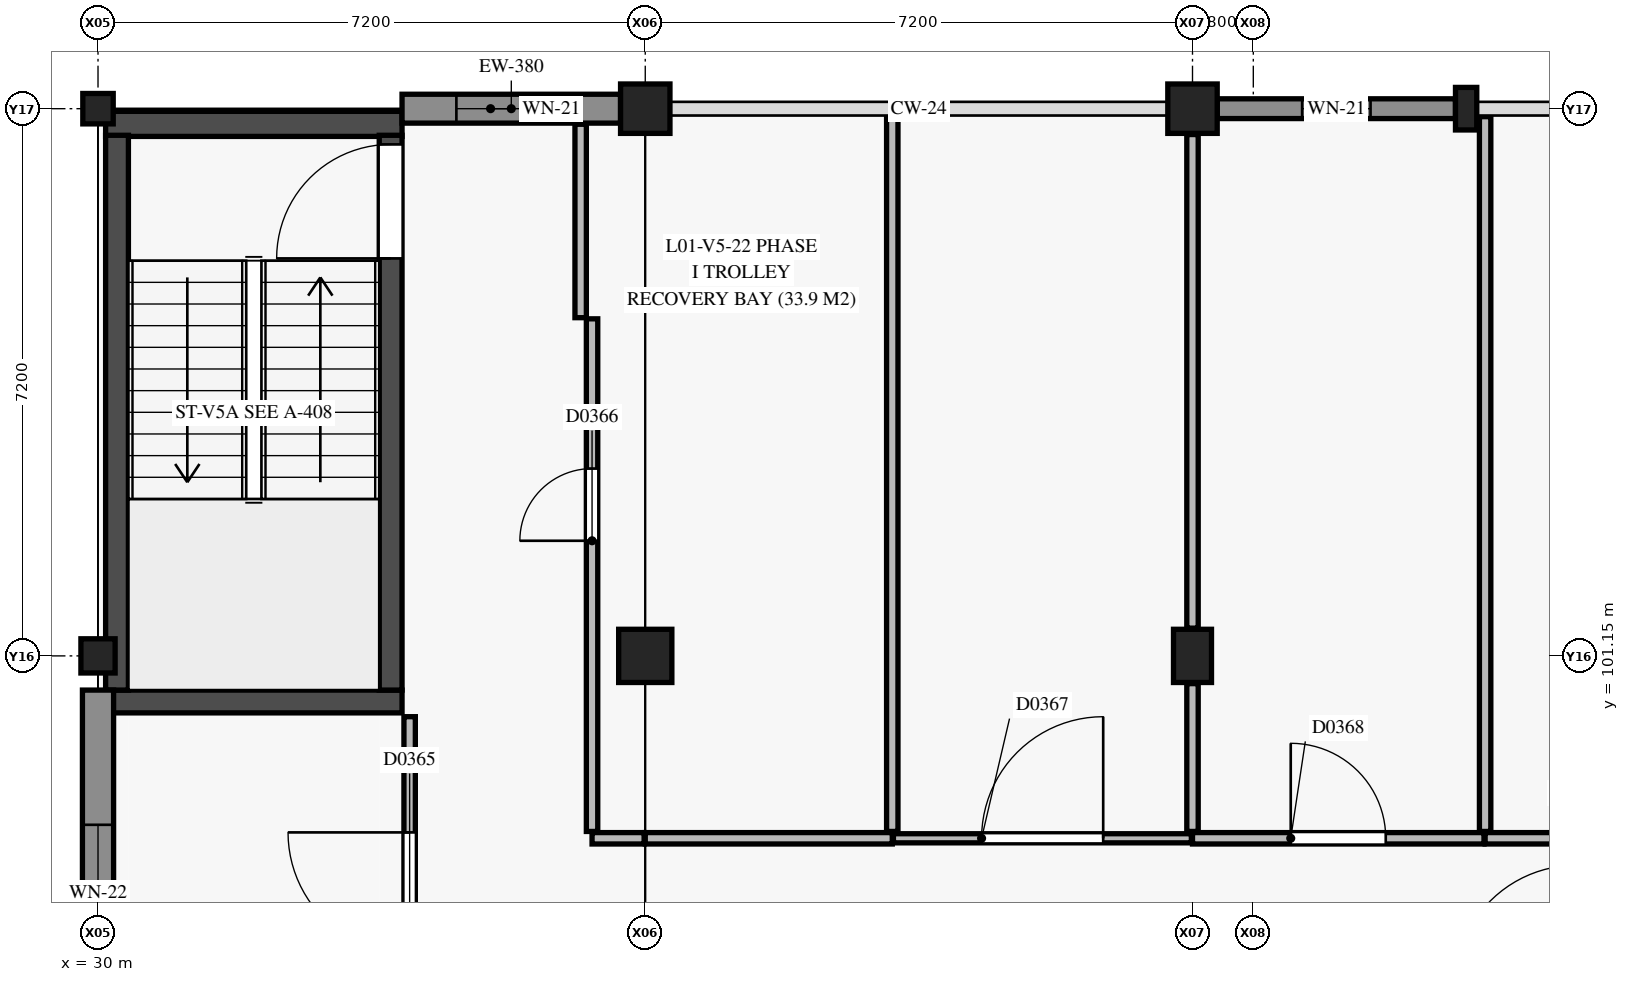
"""IFC4 building model, lengths in metres.
Left out: names, types, materials, properties, quantities, classifications, styles, units other than length and angle.
Written with IfcOpenShell. Run it as: python <this file> out.ifc"""

import sys

from ifc_helpers import new_model, si_unit, direction, frame, frame_2d, origin, origin_2d, place, context, subcontext, project, spatial, rectangle, circle, extrude, element, fill, save


model = new_model("IFC4")
c1 = context("Model", 3, precision=1e-05, world=origin(), true_north=direction((0.0, 1.0)))
c2 = subcontext(c1, "Body", "Model", "MODEL_VIEW")
j1 = project(units=[si_unit("LENGTHUNIT", "METRE"), si_unit("PLANEANGLEUNIT", "RADIAN")], contexts=[c1])
p1 = place(None, origin())
s1 = spatial("IfcSite", under=j1, at=p1, CompositionType="ELEMENT")
p2 = place(p1, origin())
s2 = spatial("IfcBuilding", under=s1, at=p2, CompositionType="ELEMENT")
p3 = place(p2, frame((0.0, 0.0, 4.8)))
s3 = spatial("IfcBuildingStorey", under=s2, at=p3, CompositionType="ELEMENT", Elevation=4.8)
p4 = place(p3, frame((30.0, 101.15, 0.0), z_axis=(0.0, 0.0, 1.0), x_axis=(1.0, 0.0, 0.0)))
e1 = element("IfcColumn", 1, at=p4, inside=s3, PredefinedType="COLUMN", context=c2, shape_type="SweptSolid", body=[
    extrude(rectangle(XDim=0.45, YDim=0.45, at=origin_2d()), origin(), (0.0, 0.0, 1.0), 4.2),
])
p5 = place(p3, frame((30.0, 108.35, 0.0), z_axis=(0.0, 0.0, 1.0), x_axis=(1.0, 0.0, 0.0)))
e2 = element("IfcColumn", 2, at=p5, inside=s3, PredefinedType="COLUMN", context=c2, shape_type="SweptSolid", body=[
    extrude(rectangle(XDim=0.4, YDim=0.4, at=origin_2d()), origin(), (0.0, 0.0, 1.0), 4.2),
])
p6 = place(p3, frame((37.2, 101.15, 0.0), z_axis=(0.0, 0.0, 1.0), x_axis=(1.0, 0.0, 0.0)))
e3 = element("IfcColumn", 3, at=p6, inside=s3, PredefinedType="COLUMN", context=c2, shape_type="SweptSolid", body=[
    extrude(rectangle(XDim=0.7, YDim=0.7, at=origin_2d()), origin(), (0.0, 0.0, 1.0), 4.2),
])
p7 = place(p3, frame((37.2, 108.35, 0.0), z_axis=(0.0, 0.0, 1.0), x_axis=(1.0, 0.0, 0.0)))
e4 = element("IfcColumn", 4, at=p7, inside=s3, PredefinedType="COLUMN", context=c2, shape_type="SweptSolid", body=[
    extrude(rectangle(XDim=0.65, YDim=0.65, at=origin_2d()), origin(), (0.0, 0.0, 1.0), 4.2),
])
p8 = place(p3, frame((44.4, 101.15, 0.0), z_axis=(0.0, 0.0, 1.0), x_axis=(1.0, 0.0, 0.0)))
e5 = element("IfcColumn", 5, at=p8, inside=s3, PredefinedType="COLUMN", context=c2, shape_type="SweptSolid", body=[
    extrude(rectangle(XDim=0.5, YDim=0.7, at=origin_2d()), origin(), (0.0, 0.0, 1.0), 4.2),
])
p9 = place(p3, frame((44.4, 108.35, 0.0), z_axis=(0.0, 0.0, 1.0), x_axis=(1.0, 0.0, 0.0)))
e6 = element("IfcColumn", 6, at=p9, inside=s3, PredefinedType="COLUMN", context=c2, shape_type="SweptSolid", body=[
    extrude(circle(Radius=0.325, at=origin_2d()), origin(), (0.0, 0.0, 1.0), 4.2),
])
p10 = place(p3, frame((48.0, 108.35, 0.0), z_axis=(0.0, 0.0, 1.0), x_axis=(1.0, 0.0, 0.0)))
e7 = element("IfcColumn", 7, at=p10, inside=s3, PredefinedType="PILASTER", context=c2, shape_type="SweptSolid", body=[
    extrude(rectangle(XDim=0.28, YDim=0.56, at=origin_2d()), origin(), (0.0, 0.0, 1.0), 4.2),
])
p11 = place(p3, frame((30.1, 100.55, 0.0), z_axis=(0.0, 0.0, 1.0), x_axis=(1.0, 0.0, 0.0)))
e8 = element("IfcWall", 8, at=p11, inside=s3, PredefinedType="SHEAR", context=c2, shape_type="SweptSolid", body=[
    extrude(rectangle(XDim=3.9, YDim=0.3, at=frame_2d((1.95, 0.0))), origin(), (0.0, 0.0, 1.0), 3.95),
])
p12 = place(p3, frame((30.1, 108.15, 0.0), z_axis=(0.0, 0.0, 1.0), x_axis=(1.0, 0.0, 0.0)))
e9 = element("IfcWall", 9, at=p12, inside=s3, PredefinedType="SHEAR", context=c2, shape_type="SweptSolid", body=[
    extrude(rectangle(XDim=3.9, YDim=0.33, at=frame_2d((1.95, 0.0))), origin(), (0.0, 0.0, 1.0), 3.95),
])
p13 = place(p3, frame((30.25, 100.7, 0.0), z_axis=(0.0, 0.0, 1.0), x_axis=(0.0, 1.0, 0.0)))
e10 = element("IfcWall", 10, at=p13, inside=s3, PredefinedType="SHEAR", context=c2, shape_type="SweptSolid", body=[
    extrude(rectangle(XDim=7.3, YDim=0.3, at=frame_2d((3.65, 0.0))), origin(), (0.0, 0.0, 1.0), 3.95),
])
p14 = place(p3, frame((33.85, 100.7, 0.0), z_axis=(0.0, 0.0, 1.0), x_axis=(0.0, 1.0, 0.0)))
e11 = element("IfcWall", 11, at=p14, inside=s3, PredefinedType="SHEAR", context=c2, shape_type="SweptSolid", body=[
    extrude(rectangle(XDim=7.3, YDim=0.3, at=frame_2d((3.65, 0.0))), origin(), (0.0, 0.0, 1.0), 3.95),
])
p15 = place(p14, frame((5.68, 0.0, 0.0)))
e12 = element("IfcOpeningElement", 12, at=p15, cuts=e11, PredefinedType="OPENING", context=c2, shape_type="SweptSolid", body=[
    extrude(rectangle(XDim=1.5, YDim=2.15, at=frame_2d((0.75, 1.075))), frame((0.0, 0.16, 0.0), z_axis=(0.0, -1.0, 0.0), x_axis=(1.0, 0.0, 0.0)), (0.0, 0.0, 1.0), 0.32),
])
p16 = place(p3, frame((30.0, 94.2, 0.0), z_axis=(0.0, 0.0, 1.0), x_axis=(0.0, 1.0, 0.0)))
e13 = element("IfcWall", 13, at=p16, inside=s3, PredefinedType="USERDEFINED", context=c2, shape_type="SweptSolid", body=[
    extrude(rectangle(XDim=6.5, YDim=0.41, at=frame_2d((3.25, 0.0))), origin(), (0.0, 0.0, 1.0), 3.13),
])
p17 = place(p16, frame((2.927, 0.0, 0.9)))
e14 = element("IfcOpeningElement", 14, at=p17, cuts=e13, PredefinedType="OPENING", context=c2, shape_type="SweptSolid", body=[
    extrude(rectangle(XDim=1.8, YDim=0.9, at=frame_2d((0.9, 0.45))), frame((0.0, 0.215, 0.0), z_axis=(0.0, -1.0, 0.0), x_axis=(1.0, 0.0, 0.0)), (0.0, 0.0, 1.0), 0.43),
])
p18 = place(p3, frame((34.0, 108.35, 0.0), z_axis=(0.0, 0.0, 1.0), x_axis=(1.0, 0.0, 0.0)))
e15 = element("IfcWall", 15, at=p18, inside=s3, PredefinedType="USERDEFINED", context=c2, shape_type="SweptSolid", body=[
    extrude(rectangle(XDim=2.875, YDim=0.38, at=frame_2d((1.438, 0.0))), origin(), (0.0, 0.0, 1.0), 3.13),
])
p19 = place(p18, frame((0.715, 0.0, 0.95)))
e16 = element("IfcOpeningElement", 16, at=p19, cuts=e15, PredefinedType="OPENING", context=c2, shape_type="SweptSolid", body=[
    extrude(rectangle(XDim=0.9, YDim=1.2, at=frame_2d((0.45, 0.6))), frame((0.0, 0.2, 0.0), z_axis=(0.0, -1.0, 0.0), x_axis=(1.0, 0.0, 0.0)), (0.0, 0.0, 1.0), 0.4),
])
p20 = place(p3, frame((44.725, 108.35, 0.0), z_axis=(0.0, 0.0, 1.0), x_axis=(1.0, 0.0, 0.0)))
e17 = element("IfcWall", 17, at=p20, inside=s3, PredefinedType="SOLIDWALL", context=c2, shape_type="SweptSolid", body=[
    extrude(rectangle(XDim=3.135, YDim=0.26, at=frame_2d((1.567, 0.0))), origin(), (0.0, 0.0, 1.0), 3.13),
])
p21 = place(p20, frame((1.117, 0.0, 0.95)))
e18 = element("IfcOpeningElement", 18, at=p21, cuts=e17, PredefinedType="OPENING", context=c2, shape_type="SweptSolid", body=[
    extrude(rectangle(XDim=0.9, YDim=1.2, at=frame_2d((0.45, 0.6))), frame((0.0, 0.14, 0.0), z_axis=(0.0, -1.0, 0.0), x_axis=(1.0, 0.0, 0.0)), (0.0, 0.0, 1.0), 0.28),
])
p22 = place(p3, frame((48.25, 98.75, 0.0), z_axis=(0.0, 0.0, 1.0), x_axis=(1.0, 0.0, 0.0)))
e19 = element("IfcWall", 19, at=p22, inside=s3, PredefinedType="PARTITIONING", context=c2, shape_type="SweptSolid", body=[
    extrude(rectangle(XDim=1.11, YDim=0.15, at=frame_2d((0.555, 0.0))), origin(), (0.0, 0.0, 1.0), 3.475),
])
p23 = place(p3, frame((34.1, 95.705, 0.0), z_axis=(0.0, 0.0, 1.0), x_axis=(0.0, 1.0, 0.0)))
e20 = element("IfcWall", 20, at=p23, inside=s3, PredefinedType="PARTITIONING", context=c2, shape_type="SweptSolid", body=[
    extrude(rectangle(XDim=4.645, YDim=0.15, at=frame_2d((2.323, 0.0))), origin(), (0.0, 0.0, 1.0), 3.475),
])
p24 = place(p23, frame((1.522, 0.0, 0.0)))
e21 = element("IfcOpeningElement", 21, at=p24, cuts=e20, PredefinedType="OPENING", context=c2, shape_type="SweptSolid", body=[
    extrude(rectangle(XDim=1.6, YDim=2.25, at=frame_2d((0.8, 1.125))), frame((0.0, 0.085, 0.0), z_axis=(0.0, -1.0, 0.0), x_axis=(1.0, 0.0, 0.0)), (0.0, 0.0, 1.0), 0.17),
])
p25 = place(p3, frame((36.35, 105.6, 0.0), z_axis=(0.0, 0.0, 1.0), x_axis=(0.0, 1.0, 0.0)))
e22 = element("IfcWall", 22, at=p25, inside=s3, PredefinedType="PARTITIONING", context=c2, shape_type="SweptSolid", body=[
    extrude(rectangle(XDim=2.545, YDim=0.15, at=frame_2d((1.272, 0.0))), origin(), (0.0, 0.0, 1.0), 3.95),
])
p26 = place(p3, frame((37.2, 98.75, 0.0), z_axis=(0.0, 0.0, 1.0), x_axis=(1.0, 0.0, 0.0)))
e23 = element("IfcWall", 23, at=p26, inside=s3, PredefinedType="PARTITIONING", context=c2, shape_type="SweptSolid", body=[
    extrude(rectangle(XDim=3.25, YDim=0.15, at=frame_2d((1.625, 0.0))), origin(), (0.0, 0.0, 1.0), 3.355),
])
p27 = place(p3, frame((36.5, 98.75, 0.0), z_axis=(0.0, 0.0, 1.0), x_axis=(1.0, 0.0, 0.0)))
e24 = element("IfcWall", 24, at=p27, inside=s3, PredefinedType="PARTITIONING", context=c2, shape_type="SweptSolid", body=[
    extrude(rectangle(XDim=0.685, YDim=0.15, at=frame_2d((0.343, 0.0))), origin(), (0.0, 0.0, 1.0), 3.355),
])
p28 = place(p3, frame((36.5, 98.84, 0.0), z_axis=(0.0, 0.0, 1.0), x_axis=(0.0, 1.0, 0.0)))
e25 = element("IfcWall", 25, at=p28, inside=s3, PredefinedType="PARTITIONING", context=c2, shape_type="SweptSolid", body=[
    extrude(rectangle(XDim=6.745, YDim=0.15, at=frame_2d((3.373, 0.0))), origin(), (0.0, 0.0, 1.0), 3.95),
])
p29 = place(p28, frame((3.825, 0.0, 0.0)))
e26 = element("IfcOpeningElement", 26, at=p29, cuts=e25, PredefinedType="OPENING", context=c2, shape_type="SweptSolid", body=[
    extrude(rectangle(XDim=0.95, YDim=2.1, at=frame_2d((0.475, 1.05))), frame((0.0, 0.085, 0.0), z_axis=(0.0, -1.0, 0.0), x_axis=(1.0, 0.0, 0.0)), (0.0, 0.0, 1.0), 0.17),
])
p30 = place(p3, frame((44.4, 98.75, 0.0), z_axis=(0.0, 0.0, 1.0), x_axis=(1.0, 0.0, 0.0)))
e27 = element("IfcWall", 27, at=p30, inside=s3, PredefinedType="PARTITIONING", context=c2, shape_type="SweptSolid", body=[
    extrude(rectangle(XDim=3.835, YDim=0.15, at=frame_2d((1.917, 0.0))), origin(), (0.0, 0.0, 1.0), 3.235),
])
p31 = place(p30, frame((1.292, 0.0, 0.0)))
e28 = element("IfcOpeningElement", 28, at=p31, cuts=e27, PredefinedType="OPENING", context=c2, shape_type="SweptSolid", body=[
    extrude(rectangle(XDim=1.25, YDim=2.15, at=frame_2d((0.625, 1.075))), frame((0.0, 0.085, 0.0), z_axis=(0.0, -1.0, 0.0), x_axis=(1.0, 0.0, 0.0)), (0.0, 0.0, 1.0), 0.17),
])
p32 = place(p3, frame((40.465, 98.75, 0.0), z_axis=(0.0, 0.0, 1.0), x_axis=(1.0, 0.0, 0.0)))
e29 = element("IfcWall", 29, at=p32, inside=s3, PredefinedType="PARTITIONING", context=c2, shape_type="SweptSolid", body=[
    extrude(rectangle(XDim=3.92, YDim=0.12, at=frame_2d((1.96, 0.0))), origin(), (0.0, 0.0, 1.0), 3.235),
])
p33 = place(p32, frame((1.16, 0.0, 0.0)))
e30 = element("IfcOpeningElement", 30, at=p33, cuts=e29, PredefinedType="OPENING", context=c2, shape_type="SweptSolid", body=[
    extrude(rectangle(XDim=1.6, YDim=2.25, at=frame_2d((0.8, 1.125))), frame((0.0, 0.07, 0.0), z_axis=(0.0, -1.0, 0.0), x_axis=(1.0, 0.0, 0.0)), (0.0, 0.0, 1.0), 0.14),
])
p34 = place(p3, frame((48.25, 98.84, 0.0), z_axis=(0.0, 0.0, 1.0), x_axis=(0.0, 1.0, 0.0)))
e31 = element("IfcWall", 31, at=p34, inside=s3, PredefinedType="PARTITIONING", context=c2, shape_type="SweptSolid", body=[
    extrude(rectangle(XDim=9.405, YDim=0.15, at=frame_2d((4.703, 0.0))), origin(), (0.0, 0.0, 1.0), 3.385),
])
p35 = place(p3, frame((40.45, 98.84, 0.0), z_axis=(0.0, 0.0, 1.0), x_axis=(0.0, 1.0, 0.0)))
e32 = element("IfcWall", 32, at=p35, inside=s3, PredefinedType="PARTITIONING", context=c2, shape_type="SweptSolid", body=[
    extrude(rectangle(XDim=9.405, YDim=0.15, at=frame_2d((4.703, 0.0))), origin(), (0.0, 0.0, 1.0), 3.355),
])
p36 = place(p3, frame((44.4, 98.84, 0.0), z_axis=(0.0, 0.0, 1.0), x_axis=(0.0, 1.0, 0.0)))
e33 = element("IfcWall", 33, at=p36, inside=s3, PredefinedType="PARTITIONING", context=c2, shape_type="SweptSolid", body=[
    extrude(rectangle(XDim=1.945, YDim=0.15, at=frame_2d((0.972, 0.0))), origin(), (0.0, 0.0, 1.0), 3.235),
])
p37 = place(p3, frame((44.4, 101.515, 0.0), z_axis=(0.0, 0.0, 1.0), x_axis=(0.0, 1.0, 0.0)))
e34 = element("IfcWall", 34, at=p37, inside=s3, PredefinedType="PARTITIONING", context=c2, shape_type="SweptSolid", body=[
    extrude(rectangle(XDim=6.495, YDim=0.15, at=frame_2d((3.248, 0.0))), origin(), (0.0, 0.0, 1.0), 3.355),
])
p38 = place(p17, origin())
e35 = element("IfcWindow", 35, at=p38, inside=s3, PartitioningType="SINGLE_PANEL", PredefinedType="WINDOW", context=c2, shape_type="SweptSolid", body=[
    extrude(rectangle(XDim=1.8, YDim=0.9, at=frame_2d((0.9, 0.45))), frame((0.0, 0.03, 0.0), z_axis=(0.0, -1.0, 0.0), x_axis=(1.0, 0.0, 0.0)), (0.0, 0.0, 1.0), 0.06),
])
fill(e14, e35)
p39 = place(p19, origin())
e36 = element("IfcWindow", 36, at=p39, inside=s3, PartitioningType="SINGLE_PANEL", PredefinedType="WINDOW", context=c2, shape_type="SweptSolid", body=[
    extrude(rectangle(XDim=0.9, YDim=1.2, at=frame_2d((0.45, 0.6))), frame((0.0, 0.03, 0.0), z_axis=(0.0, -1.0, 0.0), x_axis=(1.0, 0.0, 0.0)), (0.0, 0.0, 1.0), 0.06),
])
fill(e16, e36)
p40 = place(p21, origin())
e37 = element("IfcWindow", 37, at=p40, inside=s3, PartitioningType="SINGLE_PANEL", PredefinedType="WINDOW", context=c2, shape_type="SweptSolid", body=[
    extrude(rectangle(XDim=0.9, YDim=1.2, at=frame_2d((0.45, 0.6))), frame((0.0, 0.03, 0.0), z_axis=(0.0, -1.0, 0.0), x_axis=(1.0, 0.0, 0.0)), (0.0, 0.0, 1.0), 0.06),
])
fill(e18, e37)
p41 = place(p15, origin())
e38 = element("IfcDoor", 38, at=p41, inside=s3, OperationType="SINGLE_SWING_LEFT", PredefinedType="DOOR", context=c2, shape_type="SweptSolid", body=[
    extrude(rectangle(XDim=1.5, YDim=2.15, at=frame_2d((0.75, 1.075))), frame((0.0, 0.025, 0.0), z_axis=(0.0, -1.0, 0.0), x_axis=(1.0, 0.0, 0.0)), (0.0, 0.0, 1.0), 0.05),
])
fill(e12, e38)
p42 = place(p24, origin())
e39 = element("IfcDoor", 39, at=p42, inside=s3, OperationType="SINGLE_SWING_RIGHT", PredefinedType="DOOR", context=c2, shape_type="SweptSolid", body=[
    extrude(rectangle(XDim=1.6, YDim=2.25, at=frame_2d((0.8, 1.125))), frame((0.0, 0.025, 0.0), z_axis=(0.0, -1.0, 0.0), x_axis=(1.0, 0.0, 0.0)), (0.0, 0.0, 1.0), 0.05),
])
fill(e21, e39)
p43 = place(p29, origin())
e40 = element("IfcDoor", 40, at=p43, inside=s3, OperationType="SINGLE_SWING_LEFT", PredefinedType="DOOR", context=c2, shape_type="SweptSolid", body=[
    extrude(rectangle(XDim=0.95, YDim=2.1, at=frame_2d((0.475, 1.05))), frame((0.0, 0.025, 0.0), z_axis=(0.0, -1.0, 0.0), x_axis=(1.0, 0.0, 0.0)), (0.0, 0.0, 1.0), 0.05),
])
fill(e26, e40)
p44 = place(p33, origin())
e41 = element("IfcDoor", 41, at=p44, inside=s3, OperationType="SINGLE_SWING_RIGHT", PredefinedType="DOOR", context=c2, shape_type="SweptSolid", body=[
    extrude(rectangle(XDim=1.6, YDim=2.25, at=frame_2d((0.8, 1.125))), frame((0.0, 0.025, 0.0), z_axis=(0.0, -1.0, 0.0), x_axis=(1.0, 0.0, 0.0)), (0.0, 0.0, 1.0), 0.05),
])
fill(e30, e41)
p45 = place(p31, origin())
e42 = element("IfcDoor", 42, at=p45, inside=s3, OperationType="SINGLE_SWING_LEFT", PredefinedType="DOOR", context=c2, shape_type="SweptSolid", body=[
    extrude(rectangle(XDim=1.25, YDim=2.15, at=frame_2d((0.625, 1.075))), frame((0.0, 0.025, 0.0), z_axis=(0.0, -1.0, 0.0), x_axis=(1.0, 0.0, 0.0)), (0.0, 0.0, 1.0), 0.05),
])
fill(e28, e42)
save(model, sys.argv[1])
